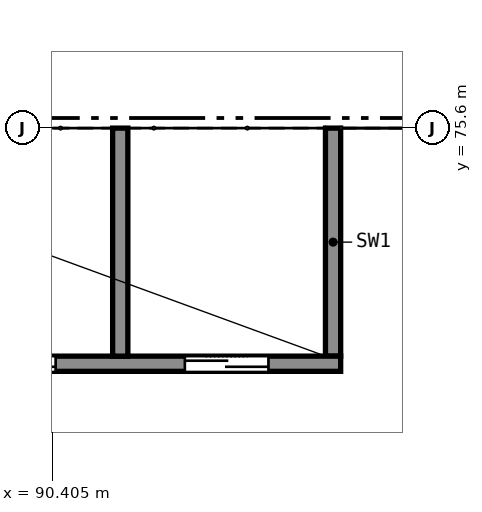
"""IFC4 building model, lengths in metres.
Left out: names, types, materials, properties, quantities, classifications, styles, units other than length and angle.
Written with IfcOpenShell. Run it as: python <this file> out.ifc"""

import sys

from ifc_helpers import new_model, si_unit, direction, frame, frame_2d, origin, place, context, subcontext, project, spatial, rectangle, extrude, element, fill, save


model = new_model("IFC4")
c1 = context("Model", 3, precision=1e-05, world=origin(), true_north=direction((0.0, 1.0)))
c2 = subcontext(c1, "Body", "Model", "MODEL_VIEW")
j1 = project(units=[si_unit("LENGTHUNIT", "METRE"), si_unit("PLANEANGLEUNIT", "RADIAN")], contexts=[c1])
p1 = place(None, origin())
s1 = spatial("IfcSite", under=j1, at=p1, CompositionType="ELEMENT")
p2 = place(p1, origin())
s2 = spatial("IfcBuilding", under=s1, at=p2, CompositionType="ELEMENT")
p3 = place(p2, frame((0.0, 0.0, 25.0)))
s3 = spatial("IfcBuildingStorey", under=s2, at=p3, CompositionType="ELEMENT", Elevation=25.0)
p4 = place(p3, frame((85.6, 72.5, 0.0), z_axis=(0.0, 0.0, 1.0), x_axis=(1.0, 0.0, 0.0)))
e1 = element("IfcWall", 1, at=p4, inside=s3, PredefinedType="SHEAR", context=c2, shape_type="SweptSolid", body=[
    extrude(rectangle(XDim=8.6, YDim=0.2, at=frame_2d((4.3, 0.0))), origin(), (0.0, 0.0, 1.0), 5.0),
])
p5 = place(p4, frame((0.95, 0.0, 0.0)))
e2 = element("IfcOpeningElement", 2, at=p5, cuts=e1, PredefinedType="OPENING", context=c2, shape_type="SweptSolid", body=[
    extrude(rectangle(XDim=1.1, YDim=2.1, at=frame_2d((0.55, 1.05))), frame((0.0, 0.11, 0.0), z_axis=(0.0, -1.0, 0.0), x_axis=(1.0, 0.0, 0.0)), (0.0, 0.0, 1.0), 0.22),
])
p6 = place(p4, frame((3.75, 0.0, 0.0)))
e3 = element("IfcOpeningElement", 3, at=p6, cuts=e1, PredefinedType="OPENING", context=c2, shape_type="SweptSolid", body=[
    extrude(rectangle(XDim=1.1, YDim=2.1, at=frame_2d((0.55, 1.05))), frame((0.0, 0.11, 0.0), z_axis=(0.0, -1.0, 0.0), x_axis=(1.0, 0.0, 0.0)), (0.0, 0.0, 1.0), 0.22),
])
p7 = place(p4, frame((6.55, 0.0, 0.0)))
e4 = element("IfcOpeningElement", 4, at=p7, cuts=e1, PredefinedType="OPENING", context=c2, shape_type="SweptSolid", body=[
    extrude(rectangle(XDim=1.1, YDim=2.1, at=frame_2d((0.55, 1.05))), frame((0.0, 0.11, 0.0), z_axis=(0.0, -1.0, 0.0), x_axis=(1.0, 0.0, 0.0)), (0.0, 0.0, 1.0), 0.22),
])
for number, where, z_axis, x_axis in (
    (5, (94.1, 72.6, 0.0), (0.0, 0.0, 1.0), (0.0, 1.0, 0.0)),
    (6, (91.3, 72.6, 0.0), (0.0, 0.0, 1.0), (0.0, 1.0, 0.0)),
):
    element("IfcWall", number, at=place(p3, frame(where, z_axis=z_axis, x_axis=x_axis)), inside=s3, PredefinedType="SHEAR", context=c2, shape_type="SweptSolid", body=[
        extrude(rectangle(XDim=3.0, YDim=0.2, at=frame_2d((1.5, 0.0))), origin(), (0.0, 0.0, 1.0), 5.0),
    ])
p8 = place(p6, origin())
e7 = element("IfcDoor", 7, at=p8, inside=s3, OperationType="DOUBLE_DOOR_SLIDING", PredefinedType="DOOR", context=c2, shape_type="SweptSolid", body=[
    extrude(rectangle(XDim=1.1, YDim=2.1, at=frame_2d((0.55, 1.05))), frame((0.0, 0.025, 0.0), z_axis=(0.0, -1.0, 0.0), x_axis=(1.0, 0.0, 0.0)), (0.0, 0.0, 1.0), 0.05),
])
fill(e3, e7)
p9 = place(p7, origin())
e8 = element("IfcDoor", 8, at=p9, inside=s3, OperationType="DOUBLE_DOOR_SLIDING", PredefinedType="DOOR", context=c2, shape_type="SweptSolid", body=[
    extrude(rectangle(XDim=1.1, YDim=2.1, at=frame_2d((0.55, 1.05))), frame((0.0, 0.025, 0.0), z_axis=(0.0, -1.0, 0.0), x_axis=(1.0, 0.0, 0.0)), (0.0, 0.0, 1.0), 0.05),
])
fill(e4, e8)
save(model, sys.argv[1])
